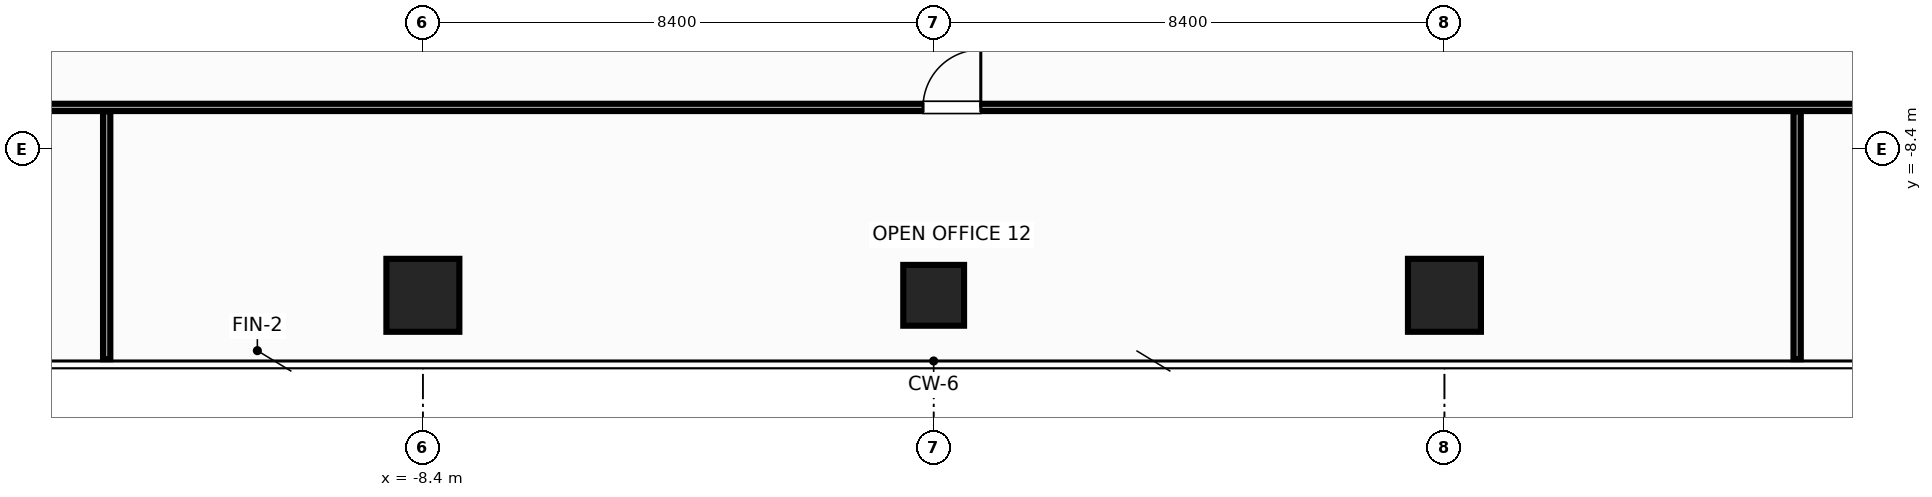
"""IFC4 building model, lengths in metres.
Left out: names, types, materials, properties, quantities, classifications, styles, units other than length and angle.
Written with IfcOpenShell. Run it as: python <this file> out.ifc"""

import sys

from ifc_helpers import new_model, si_unit, direction, frame, frame_2d, origin, origin_2d, place, context, subcontext, project, spatial, rectangle, extrude, source, transform, mapped, element, fill, save


model = new_model("IFC4")
c1 = context("Model", 3, precision=1e-05, world=origin(), true_north=direction((0.0, 1.0)))
c2 = subcontext(c1, "Body", "Model", "MODEL_VIEW")
j1 = project(units=[si_unit("LENGTHUNIT", "METRE"), si_unit("PLANEANGLEUNIT", "RADIAN")], contexts=[c1])
p1 = place(None, origin())
s1 = spatial("IfcSite", under=j1, at=p1, CompositionType="ELEMENT")
p2 = place(p1, origin())
s2 = spatial("IfcBuilding", under=s1, at=p2, CompositionType="ELEMENT")
p3 = place(p2, frame((0.0, 0.0, 272.0)))
s3 = spatial("IfcBuildingStorey", under=s2, at=p3, CompositionType="ELEMENT", Elevation=272.0)
m1 = source(origin(), c2, "Body", "SweptSolid", [
    extrude(rectangle(XDim=1.2, YDim=1.2, at=origin_2d()), origin(), (0.0, 0.0, 1.0), 3.6),
])
for number, where, z_axis, x_axis in (
    (1, (-8.4, -10.8, 0.0), (0.0, 0.0, 1.0), (1.0, 0.0, 0.0)),
    (2, (8.4, -10.8, 0.0), (0.0, 0.0, 1.0), (1.0, 0.0, 0.0)),
):
    element("IfcColumn", number, at=place(p3, frame(where, z_axis=z_axis, x_axis=x_axis)), inside=s3, PredefinedType="COLUMN", context=c2, shape_type="MappedRepresentation", body=[
        mapped(m1, transform((0.0, 0.0, 0.0), x_axis=(1.0, 0.0, 0.0), y_axis=(0.0, 1.0, 0.0), z_axis=(0.0, 0.0, 1.0), scale=1.0)),
    ])
m2 = source(origin(), c2, "Body", "SweptSolid", [
    extrude(rectangle(XDim=1.0, YDim=1.0, at=origin_2d()), origin(), (0.0, 0.0, 1.0), 3.6),
])
p4 = place(p3, frame((0.0, -10.8, 0.0), z_axis=(0.0, 0.0, 1.0), x_axis=(1.0, 0.0, 0.0)))
e3 = element("IfcColumn", 3, at=p4, inside=s3, PredefinedType="COLUMN", context=c2, shape_type="MappedRepresentation", body=[
    mapped(m2, transform((0.0, 0.0, 0.0), x_axis=(1.0, 0.0, 0.0), y_axis=(0.0, 1.0, 0.0), z_axis=(0.0, 0.0, 1.0), scale=1.0)),
])
m3 = source(origin(), c2, "Body", "SweptSolid", [
    extrude(rectangle(XDim=32.04, YDim=0.12, at=frame_2d((16.02, 0.0))), origin(), (0.0, 0.0, 1.0), 2.755),
])
p5 = place(p3, frame((-16.02, -7.71, 0.0), z_axis=(0.0, 0.0, 1.0), x_axis=(1.0, 0.0, 0.0)))
e4 = element("IfcWall", 4, at=p5, inside=s3, PredefinedType="PARTITIONING", context=c2, shape_type="MappedRepresentation", body=[
    mapped(m3, transform((0.0, 0.0, 0.0), x_axis=(1.0, 0.0, 0.0), y_axis=(0.0, 1.0, 0.0), z_axis=(0.0, 0.0, 1.0), scale=1.0)),
])
p6 = place(p5, frame((15.845, 0.0, 0.0)))
e5 = element("IfcOpeningElement", 5, at=p6, cuts=e4, PredefinedType="OPENING", context=c2, shape_type="SweptSolid", body=[
    extrude(rectangle(XDim=0.95, YDim=2.15, at=frame_2d((0.475, 1.075))), frame((0.0, 0.072, 0.0), z_axis=(0.0, -1.0, 0.0), x_axis=(1.0, 0.0, 0.0)), (0.0, 0.0, 1.0), 0.144),
])
m4 = source(origin(), c2, "Body", "SweptSolid", [
    extrude(rectangle(XDim=4.075, YDim=0.12, at=frame_2d((2.038, 0.0))), origin(), (0.0, 0.0, 1.0), 2.905),
])
for number, where, z_axis, x_axis in (
    (6, (-13.6, -11.85, 0.0), (0.0, 0.0, 1.0), (0.0, 1.0, 0.0)),
    (7, (14.2, -11.85, 0.0), (0.0, 0.0, 1.0), (0.0, 1.0, 0.0)),
):
    element("IfcWall", number, at=place(p3, frame(where, z_axis=z_axis, x_axis=x_axis)), inside=s3, PredefinedType="PARTITIONING", context=c2, shape_type="MappedRepresentation", body=[
        mapped(m4, transform((0.0, 0.0, 0.0), x_axis=(1.0, 0.0, 0.0), y_axis=(0.0, 1.0, 0.0), z_axis=(0.0, 0.0, 1.0), scale=1.0)),
    ])
m5 = source(origin(), c2, "Body", "SweptSolid", [
    extrude(rectangle(XDim=0.95, YDim=2.15, at=frame_2d((0.475, 1.075))), frame((0.0, 0.025, 0.0), z_axis=(0.0, -1.0, 0.0), x_axis=(1.0, 0.0, 0.0)), (0.0, 0.0, 1.0), 0.05),
])
p7 = place(p6, origin())
e8 = element("IfcDoor", 8, at=p7, inside=s3, OperationType="SINGLE_SWING_RIGHT", PredefinedType="DOOR", context=c2, shape_type="MappedRepresentation", body=[
    mapped(m5, transform((0.0, 0.0, 0.0), x_axis=(1.0, 0.0, 0.0), y_axis=(0.0, 1.0, 0.0), z_axis=(0.0, 0.0, 1.0), scale=1.0)),
])
fill(e5, e8)
save(model, sys.argv[1])
